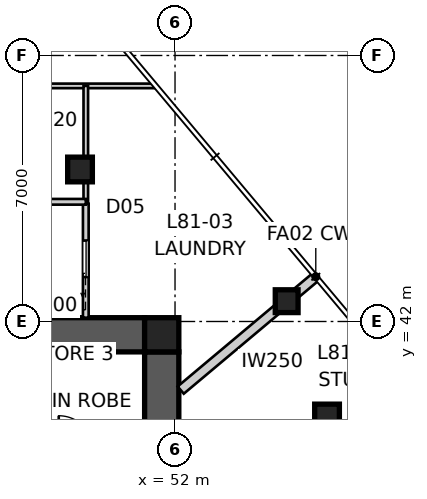
"""IFC4 building model, lengths in metres.
Left out: names, types, materials, properties, quantities, classifications, styles, units other than length and angle.
Written with IfcOpenShell. Run it as: python <this file> out.ifc"""

import sys

from ifc_helpers import new_model, si_unit, direction, frame, frame_2d, origin, origin_2d, place, context, subcontext, project, spatial, polyline, rectangle, outline, extrude, element, fill, save


model = new_model("IFC4")
c1 = context("Model", 3, precision=1e-05, world=origin(), true_north=direction((0.0, 1.0)))
c2 = subcontext(c1, "Body", "Model", "MODEL_VIEW")
j1 = project(units=[si_unit("LENGTHUNIT", "METRE"), si_unit("PLANEANGLEUNIT", "RADIAN")], contexts=[c1])
p1 = place(None, origin())
s1 = spatial("IfcSite", under=j1, at=p1, CompositionType="ELEMENT")
p2 = place(p1, origin())
s2 = spatial("IfcBuilding", under=s1, at=p2, CompositionType="ELEMENT")
p3 = place(p2, frame((0.0, 0.0, 293.0)))
s3 = spatial("IfcBuildingStorey", under=s2, at=p3, CompositionType="ELEMENT", Elevation=293.0)
p4 = place(p3, frame((28.8, 41.65, 0.0), z_axis=(0.0, 0.0, 1.0), x_axis=(1.0, 0.0, 0.0)))
e1 = element("IfcWall", 1, at=p4, inside=s3, PredefinedType="SHEAR", context=c2, shape_type="SweptSolid", body=[
    extrude(outline(polyline([(0.0, -0.45), (22.4, -0.45), (22.4, -0.025), (22.85, -0.025), (22.85, 0.025), (22.4, 0.025), (22.4, 0.45), (0.0, 0.45), (0.0, 0.025), (-0.45, 0.025), (-0.45, -0.025), (0.0, -0.025), (0.0, -0.45)])), origin(), (0.0, 0.0, 1.0), 3.4),
])
p5 = place(p3, frame((51.65, 18.8, 0.0), z_axis=(0.0, 0.0, 1.0), x_axis=(0.0, 1.0, 0.0)))
e2 = element("IfcWall", 2, at=p5, inside=s3, PredefinedType="SHEAR", context=c2, shape_type="SweptSolid", body=[
    extrude(outline(polyline([(0.0, -0.45), (22.4, -0.45), (22.4, -0.025), (22.85, -0.025), (22.85, 0.025), (22.4, 0.025), (22.4, 0.45), (0.0, 0.45), (0.0, 0.025), (-0.45, 0.025), (-0.45, -0.025), (0.0, -0.025), (0.0, -0.45)])), origin(), (0.0, 0.0, 1.0), 3.4),
])
p6 = place(p5, frame((11.14, 0.0, 0.0)))
e3 = element("IfcOpeningElement", 3, at=p6, cuts=e2, PredefinedType="OPENING", context=c2, shape_type="SweptSolid", body=[
    extrude(rectangle(XDim=1.02, YDim=2.4, at=frame_2d((0.51, 1.2))), frame((0.0, 0.46, 0.0), z_axis=(0.0, -1.0, 0.0), x_axis=(1.0, 0.0, 0.0)), (0.0, 0.0, 1.0), 0.92),
])
p7 = place(p3, frame((51.65, 41.65, 0.0), z_axis=(0.0, 0.0, 1.0), x_axis=(1.0, 0.0, 0.0)))
e4 = element("IfcColumn", 4, at=p7, inside=s3, PredefinedType="COLUMN", context=c2, shape_type="SweptSolid", body=[
    extrude(rectangle(XDim=0.9, YDim=0.9, at=origin_2d()), origin(), (0.0, 0.0, 1.0), 3.4),
])
p8 = place(p3, frame((54.938, 42.534, 0.0), z_axis=(0.0, 0.0, 1.0), x_axis=(1.0, 0.0, 0.0)))
e5 = element("IfcColumn", 5, at=p8, inside=s3, PredefinedType="COLUMN", context=c2, shape_type="SweptSolid", body=[
    extrude(rectangle(XDim=0.6, YDim=0.6, at=origin_2d()), origin(), (0.0, 0.0, 1.0), 3.4),
])
for number, where, z_axis, x_axis in (
    (6, (56.0, 39.5, 0.0), (0.0, 0.0, 1.0), (1.0, 0.0, 0.0)),
    (7, (49.5, 46.0, 0.0), (0.0, 0.0, 1.0), (1.0, 0.0, 0.0)),
):
    element("IfcColumn", number, at=place(p3, frame(where, z_axis=z_axis, x_axis=x_axis)), inside=s3, PredefinedType="COLUMN", context=c2, shape_type="SweptSolid", body=[
        extrude(rectangle(XDim=0.65, YDim=0.65, at=origin_2d()), origin(), (0.0, 0.0, 1.0), 3.4),
    ])
p9 = place(p3, frame((55.704, 43.177, 0.0), z_axis=(0.0, 0.0, 1.0), x_axis=(-0.76603440109, -0.64279957712, 0.0)))
e8 = element("IfcWall", 8, at=p9, inside=s3, PredefinedType="PARTITIONING", context=c2, shape_type="SweptSolid", body=[
    extrude(rectangle(XDim=4.64, YDim=0.25, at=frame_2d((2.32, 0.0))), origin(), (0.0, 0.0, 1.0), 3.25),
])
p10 = place(p3, frame((35.754, 48.2, 0.0), z_axis=(0.0, 0.0, 1.0), x_axis=(1.0, 0.0, 0.0)))
e9 = element("IfcWall", 9, at=p10, inside=s3, PredefinedType="PARTITIONING", context=c2, shape_type="SweptSolid", body=[
    extrude(rectangle(XDim=15.683, YDim=0.12, at=frame_2d((7.842, 0.0))), origin(), (0.0, 0.0, 1.0), 3.25),
])
p11 = place(p10, frame((5.433, 0.0, 0.0)))
e10 = element("IfcOpeningElement", 10, at=p11, cuts=e9, PredefinedType="OPENING", context=c2, shape_type="SweptSolid", body=[
    extrude(rectangle(XDim=0.96, YDim=2.1, at=frame_2d((0.48, 1.05))), frame((0.0, 0.07, 0.0), z_axis=(0.0, -1.0, 0.0), x_axis=(1.0, 0.0, 0.0)), (0.0, 0.0, 1.0), 0.14),
])
p12 = place(p10, frame((11.114, 0.0, 0.0)))
e11 = element("IfcOpeningElement", 11, at=p12, cuts=e9, PredefinedType="OPENING", context=c2, shape_type="SweptSolid", body=[
    extrude(rectangle(XDim=0.92, YDim=2.34, at=frame_2d((0.46, 1.17))), frame((0.0, 0.07, 0.0), z_axis=(0.0, -1.0, 0.0), x_axis=(1.0, 0.0, 0.0)), (0.0, 0.0, 1.0), 0.14),
])
p13 = place(p3, frame((49.652, 42.1, 0.0), z_axis=(0.0, 0.0, 1.0), x_axis=(0.0, 1.0, 0.0)))
e12 = element("IfcWall", 12, at=p13, inside=s3, PredefinedType="SOLIDWALL", context=c2, shape_type="SweptSolid", body=[
    extrude(rectangle(XDim=3.0, YDim=0.15, at=frame_2d((1.5, 0.0))), origin(), (0.0, 0.0, 1.0), 3.25),
])
p14 = place(p13, frame((1.07, 0.0, 0.0)))
e13 = element("IfcOpeningElement", 13, at=p14, cuts=e12, PredefinedType="OPENING", context=c2, shape_type="SweptSolid", body=[
    extrude(rectangle(XDim=0.96, YDim=2.1, at=frame_2d((0.48, 1.05))), frame((0.0, 0.085, 0.0), z_axis=(0.0, -1.0, 0.0), x_axis=(1.0, 0.0, 0.0)), (0.0, 0.0, 1.0), 0.17),
])
p15 = place(p3, frame((49.652, 45.1, 0.0), z_axis=(0.0, 0.0, 1.0), x_axis=(0.0, 1.0, 0.0)))
e14 = element("IfcWall", 14, at=p15, inside=s3, PredefinedType="PARTITIONING", context=c2, shape_type="SweptSolid", body=[
    extrude(rectangle(XDim=3.1, YDim=0.12, at=frame_2d((1.55, 0.0))), origin(), (0.0, 0.0, 1.0), 3.25),
])
p16 = place(p3, frame((45.003, 45.15, 0.0), z_axis=(0.0, 0.0, 1.0), x_axis=(1.0, 0.0, 0.0)))
e15 = element("IfcWall", 15, at=p16, inside=s3, PredefinedType="SOLIDWALL", context=c2, shape_type="SweptSolid", body=[
    extrude(rectangle(XDim=4.649, YDim=0.15, at=frame_2d((2.324, 0.0))), origin(), (0.0, 0.0, 1.0), 3.25),
])
p17 = place(p14, origin())
e16 = element("IfcDoor", 16, at=p17, inside=s3, OperationType="SLIDING_TO_LEFT", PredefinedType="DOOR", context=c2, shape_type="SweptSolid", body=[
    extrude(rectangle(XDim=0.96, YDim=2.1, at=frame_2d((0.48, 1.05))), frame((0.0, 0.025, 0.0), z_axis=(0.0, -1.0, 0.0), x_axis=(1.0, 0.0, 0.0)), (0.0, 0.0, 1.0), 0.05),
])
fill(e13, e16)
save(model, sys.argv[1])
